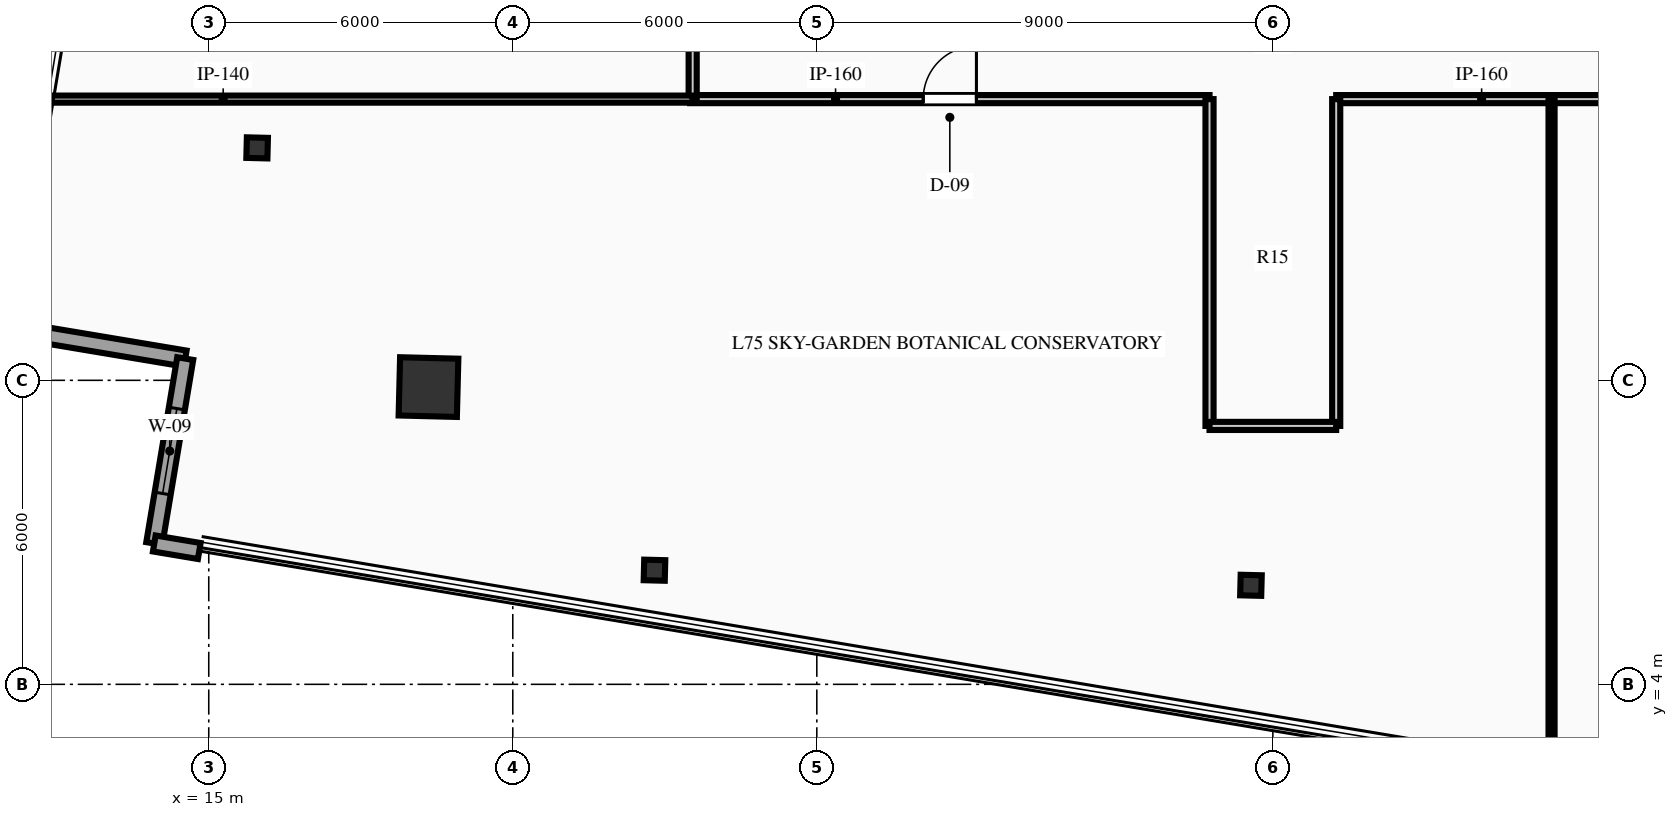
"""IFC4 building model, lengths in metres.
Left out: names, types, materials, properties, quantities, classifications, styles, units other than length and angle.
Written with IfcOpenShell. Run it as: python <this file> out.ifc"""

import sys

from ifc_helpers import new_model, si_unit, direction, frame, frame_2d, origin, origin_2d, place, context, subcontext, project, spatial, rectangle, hollow_rectangle, i_section, extrude, element, fill, save


model = new_model("IFC4")
c1 = context("Model", 3, precision=1e-05, world=origin(), true_north=direction((0.0, 1.0)))
c2 = subcontext(c1, "Body", "Model", "MODEL_VIEW")
j1 = project(units=[si_unit("LENGTHUNIT", "METRE"), si_unit("PLANEANGLEUNIT", "RADIAN")], contexts=[c1])
p1 = place(None, origin())
s1 = spatial("IfcSite", under=j1, at=p1, CompositionType="ELEMENT")
p2 = place(p1, origin())
s2 = spatial("IfcBuilding", under=s1, at=p2, CompositionType="ELEMENT")
p3 = place(p2, frame((0.0, 0.0, 298.2)))
s3 = spatial("IfcBuildingStorey", under=s2, at=p3, CompositionType="ELEMENT", Elevation=298.2)
p4 = place(p3, frame((19.336, 9.866, 0.0), z_axis=(0.0, 0.0, 1.0), x_axis=(0.025304572866, 0.999679788028, 0.0)))
e1 = element("IfcColumn", 1, at=p4, inside=s3, PredefinedType="COLUMN", context=c2, shape_type="SweptSolid", body=[
    extrude(hollow_rectangle(XDim=1.15, YDim=1.15, WallThickness=0.05, at=origin_2d()), origin(), (0.0, 0.0, 1.0), 4.5),
])
for number, where, z_axis, x_axis in (
    (2, (15.955, 14.588, 0.0), (0.0, 0.0, 1.0), (0.025, 1.0, 0.0)),
    (3, (23.796, 6.252, 0.0), (0.0, 0.0, 1.0), (0.025, 1.0, 0.0)),
    (4, (35.568, 5.955, 0.0), (0.0, 0.0, 1.0), (0.025, 1.0, 0.0)),
):
    element("IfcColumn", number, at=place(p3, frame(where, z_axis=z_axis, x_axis=x_axis)), inside=s3, PredefinedType="COLUMN", context=c2, shape_type="SweptSolid", body=[
        extrude(i_section(OverallWidth=0.406, OverallDepth=0.416, WebThickness=0.03, FlangeThickness=0.048, at=origin_2d()), origin(), (0.0, 0.0, 1.0), 4.5),
    ])
p5 = place(p3, frame((14.536, 10.429, 0.0), z_axis=(0.0, 0.0, 1.0), x_axis=(-0.986288501332, 0.165030276432, 0.0)))
e5 = element("IfcWall", 5, at=p5, inside=s3, PredefinedType="STANDARD", context=c2, shape_type="SweptSolid", body=[
    extrude(rectangle(XDim=3.7, YDim=0.32, at=frame_2d((1.85, 0.0))), origin(), (0.0, 0.0, 1.0), 4.24),
])
p6 = place(p3, frame((13.925, 6.78, 0.0), z_axis=(0.0, 0.0, 1.0), x_axis=(0.165019536794, 0.986290298278, 0.0)))
e6 = element("IfcWall", 6, at=p6, inside=s3, PredefinedType="STANDARD", context=c2, shape_type="SweptSolid", body=[
    extrude(rectangle(XDim=3.7, YDim=0.32, at=frame_2d((1.85, 0.0))), origin(), (0.0, 0.0, 1.0), 4.24),
])
p7 = place(p6, frame((1.0, 0.0, 0.75)))
e7 = element("IfcOpeningElement", 7, at=p7, cuts=e6, PredefinedType="OPENING", context=c2, shape_type="SweptSolid", body=[
    extrude(rectangle(XDim=1.7, YDim=2.5, at=frame_2d((0.85, 1.25))), frame((0.0, 0.17, 0.0), z_axis=(0.0, -1.0, 0.0), x_axis=(1.0, 0.0, 0.0)), (0.0, 0.0, 1.0), 0.34),
])
p8 = place(p3, frame((14.813, 6.631, 0.0), z_axis=(0.0, 0.0, 1.0), x_axis=(-0.98630580598, 0.164926823442, 0.0)))
e8 = element("IfcWall", 8, at=p8, inside=s3, PredefinedType="STANDARD", context=c2, shape_type="SweptSolid", body=[
    extrude(rectangle(XDim=0.9, YDim=0.32, at=frame_2d((0.45, 0.0))), origin(), (0.0, 0.0, 1.0), 4.24),
])
p9 = place(p3, frame((24.5, 15.55, 0.0), z_axis=(0.0, 0.0, 1.0), x_axis=(1.0, 0.0, 0.0)))
e9 = element("IfcWall", 9, at=p9, inside=s3, PredefinedType="PARTITIONING", context=c2, shape_type="SweptSolid", body=[
    extrude(rectangle(XDim=10.25, YDim=0.16, at=frame_2d((5.125, 0.0))), origin(), (0.0, 0.0, 1.0), 4.24),
])
p10 = place(p9, frame((4.6, 0.0, 0.0)))
e10 = element("IfcOpeningElement", 10, at=p10, cuts=e9, PredefinedType="OPENING", context=c2, shape_type="SweptSolid", body=[
    extrude(rectangle(XDim=1.05, YDim=2.15, at=frame_2d((0.525, 1.075))), frame((0.0, 0.09, 0.0), z_axis=(0.0, -1.0, 0.0), x_axis=(1.0, 0.0, 0.0)), (0.0, 0.0, 1.0), 0.18),
])
p11 = place(p3, frame((37.25, 15.55, 0.0), z_axis=(0.0, 0.0, 1.0), x_axis=(1.0, 0.0, 0.0)))
e11 = element("IfcWall", 11, at=p11, inside=s3, PredefinedType="PARTITIONING", context=c2, shape_type="SweptSolid", body=[
    extrude(rectangle(XDim=10.25, YDim=0.16, at=frame_2d((5.125, 0.0))), origin(), (0.0, 0.0, 1.0), 4.24),
])
p12 = place(p11, frame((5.419, 0.0, 0.0)))
e12 = element("IfcOpeningElement", 12, at=p12, cuts=e11, PredefinedType="OPENING", context=c2, shape_type="SweptSolid", body=[
    extrude(rectangle(XDim=1.05, YDim=2.15, at=frame_2d((0.525, 1.075))), frame((0.0, 0.09, 0.0), z_axis=(0.0, -1.0, 0.0), x_axis=(1.0, 0.0, 0.0)), (0.0, 0.0, 1.0), 0.18),
])
p13 = place(p3, frame((24.55, 15.55, 0.0), z_axis=(0.0, 0.0, 1.0), x_axis=(0.0, 1.0, 0.0)))
e13 = element("IfcWall", 13, at=p13, inside=s3, PredefinedType="PARTITIONING", context=c2, shape_type="SweptSolid", body=[
    extrude(rectangle(XDim=9.2, YDim=0.16, at=frame_2d((4.6, 0.0))), origin(), (0.0, 0.0, 1.0), 4.24),
])
p14 = place(p13, frame((3.543, 0.0, 0.0)))
e14 = element("IfcOpeningElement", 14, at=p14, cuts=e13, PredefinedType="OPENING", context=c2, shape_type="SweptSolid", body=[
    extrude(rectangle(XDim=1.05, YDim=2.15, at=frame_2d((0.525, 1.075))), frame((0.0, 0.09, 0.0), z_axis=(0.0, -1.0, 0.0), x_axis=(1.0, 0.0, 0.0)), (0.0, 0.0, 1.0), 0.18),
])
for number, where, z_axis, x_axis in (
    (15, (34.75, 9.1, 0.0), (0.0, 0.0, 1.0), (0.0, 1.0, 0.0)),
    (16, (37.25, 9.1, 0.0), (0.0, 0.0, 1.0), (0.0, 1.0, 0.0)),
):
    element("IfcWall", number, at=place(p3, frame(where, z_axis=z_axis, x_axis=x_axis)), inside=s3, PredefinedType="PARTITIONING", context=c2, shape_type="SweptSolid", body=[
        extrude(rectangle(XDim=6.45, YDim=0.16, at=frame_2d((3.225, 0.0))), origin(), (0.0, 0.0, 1.0), 4.24),
    ])
p15 = place(p3, frame((34.75, 9.1, 0.0), z_axis=(0.0, 0.0, 1.0), x_axis=(1.0, 0.0, 0.0)))
e17 = element("IfcWall", 17, at=p15, inside=s3, PredefinedType="PARTITIONING", context=c2, shape_type="SweptSolid", body=[
    extrude(rectangle(XDim=2.5, YDim=0.16, at=frame_2d((1.25, 0.0))), origin(), (0.0, 0.0, 1.0), 4.24),
])
p16 = place(p3, frame((11.682, 15.55, 0.0), z_axis=(0.0, 0.0, 1.0), x_axis=(1.0, 0.0, 0.0)))
e18 = element("IfcWall", 18, at=p16, inside=s3, PredefinedType="PARTITIONING", context=c2, shape_type="SweptSolid", body=[
    extrude(rectangle(XDim=12.868, YDim=0.14, at=frame_2d((6.434, 0.0))), origin(), (0.0, 0.0, 1.0), 3.829),
])
p17 = place(p3, frame((41.5, 2.206, 0.0), z_axis=(0.0, 0.0, 1.0), x_axis=(0.0, 1.0, 0.0)))
e19 = element("IfcWall", 19, at=p17, inside=s3, PredefinedType="PARTITIONING", context=c2, shape_type="SweptSolid", body=[
    extrude(rectangle(XDim=13.344, YDim=0.12, at=frame_2d((6.672, 0.0))), origin(), (0.0, 0.0, 1.0), 4.24),
])
p18 = place(p7, origin())
e20 = element("IfcWindow", 20, at=p18, inside=s3, PartitioningType="SINGLE_PANEL", PredefinedType="WINDOW", context=c2, shape_type="SweptSolid", body=[
    extrude(rectangle(XDim=1.7, YDim=2.5, at=frame_2d((0.85, 1.25))), frame((0.0, 0.03, 0.0), z_axis=(0.0, -1.0, 0.0), x_axis=(1.0, 0.0, 0.0)), (0.0, 0.0, 1.0), 0.06),
])
fill(e7, e20)
p19 = place(p10, origin())
e21 = element("IfcDoor", 21, at=p19, inside=s3, OperationType="SINGLE_SWING_RIGHT", PredefinedType="DOOR", context=c2, shape_type="SweptSolid", body=[
    extrude(rectangle(XDim=1.05, YDim=2.15, at=frame_2d((0.525, 1.075))), frame((0.0, 0.025, 0.0), z_axis=(0.0, -1.0, 0.0), x_axis=(1.0, 0.0, 0.0)), (0.0, 0.0, 1.0), 0.05),
])
fill(e10, e21)
save(model, sys.argv[1])
